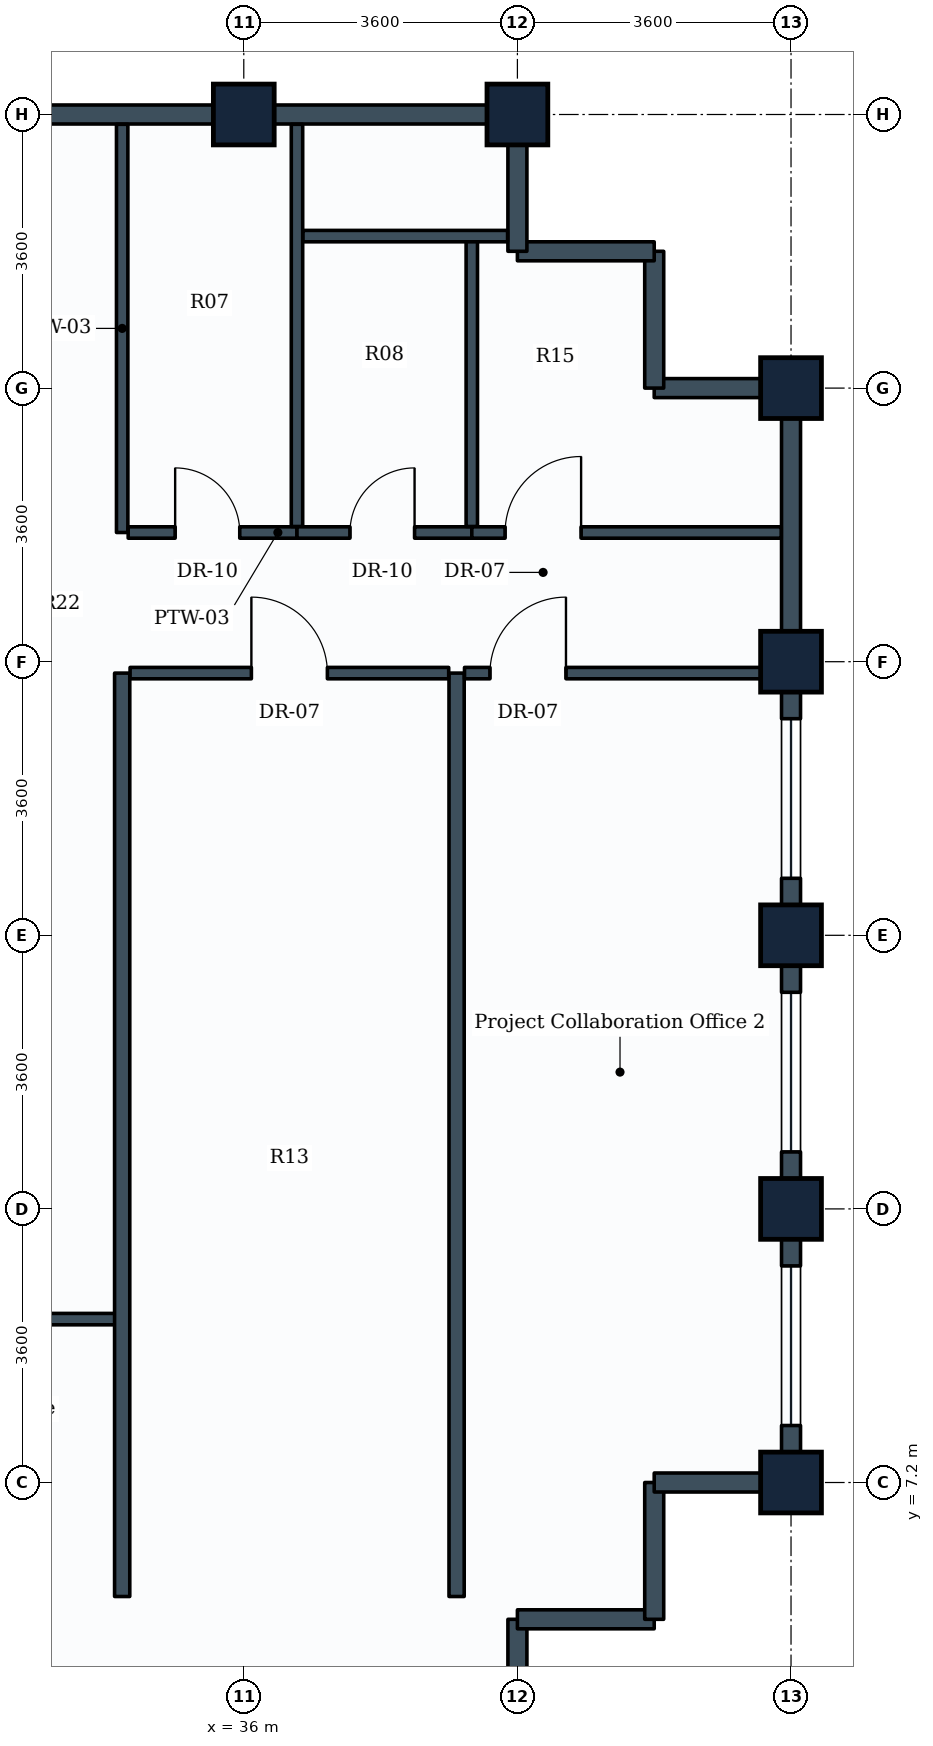
"""IFC4 building model, lengths in metres.
Left out: names, types, materials, properties, quantities, classifications, styles, units other than length and angle.
Written with IfcOpenShell. Run it as: python <this file> out.ifc"""

import sys

from ifc_helpers import new_model, si_unit, direction, frame, frame_2d, origin, origin_2d, place, context, subcontext, project, spatial, rectangle, extrude, element, fill, save


model = new_model("IFC4")
c1 = context("Model", 3, precision=1e-05, world=origin(), true_north=direction((0.0, 1.0)))
c2 = subcontext(c1, "Body", "Model", "MODEL_VIEW")
j1 = project(units=[si_unit("LENGTHUNIT", "METRE"), si_unit("PLANEANGLEUNIT", "RADIAN")], contexts=[c1])
p1 = place(None, origin())
s1 = spatial("IfcSite", under=j1, at=p1, CompositionType="ELEMENT")
p2 = place(p1, origin())
s2 = spatial("IfcBuilding", under=s1, at=p2, CompositionType="ELEMENT")
p3 = place(p2, frame((0.0, 0.0, 270.2)))
s3 = spatial("IfcBuildingStorey", under=s2, at=p3, CompositionType="ELEMENT", Elevation=270.2)
for number, where, z_axis, x_axis in (
    (1, (36.0, 25.2, 0.0), (0.0, 0.0, 1.0), (1.0, 0.0, 0.0)),
    (2, (39.6, 25.2, 0.0), (0.0, 0.0, 1.0), (1.0, 0.0, 0.0)),
    (3, (43.2, 7.2, 0.0), (0.0, 0.0, 1.0), (1.0, 0.0, 0.0)),
    (4, (43.2, 10.8, 0.0), (0.0, 0.0, 1.0), (0.0, 1.0, 0.0)),
    (5, (43.2, 14.4, 0.0), (0.0, 0.0, 1.0), (0.0, 1.0, 0.0)),
    (6, (43.2, 18.0, 0.0), (0.0, 0.0, 1.0), (0.0, 1.0, 0.0)),
    (7, (43.2, 21.6, 0.0), (0.0, 0.0, 1.0), (0.0, 1.0, 0.0)),
):
    element("IfcColumn", number, at=place(p3, frame(where, z_axis=z_axis, x_axis=x_axis)), inside=s3, PredefinedType="COLUMN", context=c2, shape_type="SweptSolid", body=[
        extrude(rectangle(XDim=0.8, YDim=0.8, at=origin_2d()), origin(), (0.0, 0.0, 1.0), 3.6),
    ])
p4 = place(p3, frame((39.6, 5.4, 0.0), z_axis=(0.0, 0.0, 1.0), x_axis=(0.0, -1.0, 0.0)))
e8 = element("IfcWall", 8, at=p4, inside=s3, PredefinedType="STANDARD", context=c2, shape_type="SweptSolid", body=[
    extrude(rectangle(XDim=1.8, YDim=0.25, at=frame_2d((0.9, 0.0))), origin(), (0.0, 0.0, 1.0), 2.83),
])
p5 = place(p3, frame((41.4, 5.4, 0.0), z_axis=(0.0, 0.0, 1.0), x_axis=(-1.0, 0.0, 0.0)))
e9 = element("IfcWall", 9, at=p5, inside=s3, PredefinedType="STANDARD", context=c2, shape_type="SweptSolid", body=[
    extrude(rectangle(XDim=1.8, YDim=0.25, at=frame_2d((0.9, 0.0))), origin(), (0.0, 0.0, 1.0), 3.335),
])
p6 = place(p3, frame((41.4, 7.2, 0.0), z_axis=(0.0, 0.0, 1.0), x_axis=(0.0, -1.0, 0.0)))
e10 = element("IfcWall", 10, at=p6, inside=s3, PredefinedType="STANDARD", context=c2, shape_type="SweptSolid", body=[
    extrude(rectangle(XDim=1.8, YDim=0.25, at=frame_2d((0.9, 0.0))), origin(), (0.0, 0.0, 1.0), 3.335),
])
p7 = place(p3, frame((43.2, 7.2, 0.0), z_axis=(0.0, 0.0, 1.0), x_axis=(-1.0, 0.0, 0.0)))
e11 = element("IfcWall", 11, at=p7, inside=s3, PredefinedType="STANDARD", context=c2, shape_type="SweptSolid", body=[
    extrude(rectangle(XDim=1.8, YDim=0.25, at=frame_2d((0.9, 0.0))), origin(), (0.0, 0.0, 1.0), 2.83),
])
p8 = place(p3, frame((43.2, 10.8, 0.0), z_axis=(0.0, 0.0, 1.0), x_axis=(0.0, -1.0, 0.0)))
e12 = element("IfcWall", 12, at=p8, inside=s3, PredefinedType="STANDARD", context=c2, shape_type="SweptSolid", body=[
    extrude(rectangle(XDim=3.6, YDim=0.25, at=frame_2d((1.8, 0.0))), origin(), (0.0, 0.0, 1.0), 2.83),
])
p9 = place(p8, frame((0.75, 0.0, 0.85)))
e13 = element("IfcOpeningElement", 13, at=p9, cuts=e12, PredefinedType="OPENING", context=c2, shape_type="SweptSolid", body=[
    extrude(rectangle(XDim=2.1, YDim=1.35, at=frame_2d((1.05, 0.675))), frame((0.0, 0.135, 0.0), z_axis=(0.0, -1.0, 0.0), x_axis=(1.0, 0.0, 0.0)), (0.0, 0.0, 1.0), 0.27),
])
p10 = place(p3, frame((43.2, 14.4, 0.0), z_axis=(0.0, 0.0, 1.0), x_axis=(0.0, -1.0, 0.0)))
e14 = element("IfcWall", 14, at=p10, inside=s3, PredefinedType="STANDARD", context=c2, shape_type="SweptSolid", body=[
    extrude(rectangle(XDim=3.6, YDim=0.25, at=frame_2d((1.8, 0.0))), origin(), (0.0, 0.0, 1.0), 2.83),
])
p11 = place(p10, frame((0.75, 0.0, 0.85)))
e15 = element("IfcOpeningElement", 15, at=p11, cuts=e14, PredefinedType="OPENING", context=c2, shape_type="SweptSolid", body=[
    extrude(rectangle(XDim=2.1, YDim=1.35, at=frame_2d((1.05, 0.675))), frame((0.0, 0.135, 0.0), z_axis=(0.0, -1.0, 0.0), x_axis=(1.0, 0.0, 0.0)), (0.0, 0.0, 1.0), 0.27),
])
p12 = place(p3, frame((43.2, 18.0, 0.0), z_axis=(0.0, 0.0, 1.0), x_axis=(0.0, -1.0, 0.0)))
e16 = element("IfcWall", 16, at=p12, inside=s3, PredefinedType="STANDARD", context=c2, shape_type="SweptSolid", body=[
    extrude(rectangle(XDim=3.6, YDim=0.25, at=frame_2d((1.8, 0.0))), origin(), (0.0, 0.0, 1.0), 2.83),
])
p13 = place(p12, frame((0.75, 0.0, 0.85)))
e17 = element("IfcOpeningElement", 17, at=p13, cuts=e16, PredefinedType="OPENING", context=c2, shape_type="SweptSolid", body=[
    extrude(rectangle(XDim=2.1, YDim=1.35, at=frame_2d((1.05, 0.675))), frame((0.0, 0.135, 0.0), z_axis=(0.0, -1.0, 0.0), x_axis=(1.0, 0.0, 0.0)), (0.0, 0.0, 1.0), 0.27),
])
p14 = place(p3, frame((43.2, 21.6, 0.0), z_axis=(0.0, 0.0, 1.0), x_axis=(0.0, -1.0, 0.0)))
e18 = element("IfcWall", 18, at=p14, inside=s3, PredefinedType="STANDARD", context=c2, shape_type="SweptSolid", body=[
    extrude(rectangle(XDim=3.6, YDim=0.25, at=frame_2d((1.8, 0.0))), origin(), (0.0, 0.0, 1.0), 2.83),
])
p15 = place(p3, frame((41.4, 21.6, 0.0), z_axis=(0.0, 0.0, 1.0), x_axis=(1.0, 0.0, 0.0)))
e19 = element("IfcWall", 19, at=p15, inside=s3, PredefinedType="STANDARD", context=c2, shape_type="SweptSolid", body=[
    extrude(rectangle(XDim=1.8, YDim=0.25, at=frame_2d((0.9, 0.0))), origin(), (0.0, 0.0, 1.0), 2.83),
])
for number, where, z_axis, x_axis in (
    (20, (41.4, 23.4, 0.0), (0.0, 0.0, 1.0), (0.0, -1.0, 0.0)),
    (21, (39.6, 23.4, 0.0), (0.0, 0.0, 1.0), (1.0, 0.0, 0.0)),
):
    element("IfcWall", number, at=place(p3, frame(where, z_axis=z_axis, x_axis=x_axis)), inside=s3, PredefinedType="STANDARD", context=c2, shape_type="SweptSolid", body=[
        extrude(rectangle(XDim=1.8, YDim=0.25, at=frame_2d((0.9, 0.0))), origin(), (0.0, 0.0, 1.0), 3.335),
    ])
p16 = place(p3, frame((39.6, 25.2, 0.0), z_axis=(0.0, 0.0, 1.0), x_axis=(0.0, -1.0, 0.0)))
e22 = element("IfcWall", 22, at=p16, inside=s3, PredefinedType="STANDARD", context=c2, shape_type="SweptSolid", body=[
    extrude(rectangle(XDim=1.8, YDim=0.25, at=frame_2d((0.9, 0.0))), origin(), (0.0, 0.0, 1.0), 2.83),
])
for number, where, z_axis, x_axis in (
    (23, (36.0, 25.2, 0.0), (0.0, 0.0, 1.0), (1.0, 0.0, 0.0)),
    (24, (32.4, 25.2, 0.0), (0.0, 0.0, 1.0), (1.0, 0.0, 0.0)),
):
    element("IfcWall", number, at=place(p3, frame(where, z_axis=z_axis, x_axis=x_axis)), inside=s3, PredefinedType="STANDARD", context=c2, shape_type="SweptSolid", body=[
        extrude(rectangle(XDim=3.6, YDim=0.25, at=frame_2d((1.8, 0.0))), origin(), (0.0, 0.0, 1.0), 2.83),
    ])
p17 = place(p3, frame((34.4, 19.7, 0.0), z_axis=(0.0, 0.0, 1.0), x_axis=(0.0, 1.0, 0.0)))
e25 = element("IfcWall", 25, at=p17, inside=s3, PredefinedType="PARTITIONING", context=c2, shape_type="SweptSolid", body=[
    extrude(rectangle(XDim=5.371, YDim=0.15, at=frame_2d((2.686, 0.0))), origin(), (0.0, 0.0, 1.0), 2.83),
])
p18 = place(p3, frame((34.479, 19.7, 0.0), z_axis=(0.0, 0.0, 1.0), x_axis=(1.0, 0.0, 0.0)))
e26 = element("IfcWall", 26, at=p18, inside=s3, PredefinedType="PARTITIONING", context=c2, shape_type="SweptSolid", body=[
    extrude(rectangle(XDim=2.221, YDim=0.15, at=frame_2d((1.11, 0.0))), origin(), (0.0, 0.0, 1.0), 3.02),
])
p19 = place(p18, frame((0.618, 0.0, 0.0)))
e27 = element("IfcOpeningElement", 27, at=p19, cuts=e26, PredefinedType="OPENING", context=c2, shape_type="SweptSolid", body=[
    extrude(rectangle(XDim=0.85, YDim=2.1, at=frame_2d((0.425, 1.05))), frame((0.0, 0.085, 0.0), z_axis=(0.0, -1.0, 0.0), x_axis=(1.0, 0.0, 0.0)), (0.0, 0.0, 1.0), 0.17),
])
p20 = place(p3, frame((36.7, 19.779, 0.0), z_axis=(0.0, 0.0, 1.0), x_axis=(0.0, 1.0, 0.0)))
e28 = element("IfcWall", 28, at=p20, inside=s3, PredefinedType="PARTITIONING", context=c2, shape_type="SweptSolid", body=[
    extrude(rectangle(XDim=5.292, YDim=0.15, at=frame_2d((2.646, 0.0))), origin(), (0.0, 0.0, 1.0), 2.83),
])
p21 = place(p3, frame((36.7, 19.7, 0.0), z_axis=(0.0, 0.0, 1.0), x_axis=(1.0, 0.0, 0.0)))
e29 = element("IfcWall", 29, at=p21, inside=s3, PredefinedType="PARTITIONING", context=c2, shape_type="SweptSolid", body=[
    extrude(rectangle(XDim=2.3, YDim=0.15, at=frame_2d((1.15, 0.0))), origin(), (0.0, 0.0, 1.0), 3.335),
])
p22 = place(p21, frame((0.697, 0.0, 0.0)))
e30 = element("IfcOpeningElement", 30, at=p22, cuts=e29, PredefinedType="OPENING", context=c2, shape_type="SweptSolid", body=[
    extrude(rectangle(XDim=0.85, YDim=2.1, at=frame_2d((0.425, 1.05))), frame((0.0, 0.085, 0.0), z_axis=(0.0, -1.0, 0.0), x_axis=(1.0, 0.0, 0.0)), (0.0, 0.0, 1.0), 0.17),
])
p23 = place(p3, frame((39.0, 19.779, 0.0), z_axis=(0.0, 0.0, 1.0), x_axis=(0.0, 1.0, 0.0)))
e31 = element("IfcWall", 31, at=p23, inside=s3, PredefinedType="PARTITIONING", context=c2, shape_type="SweptSolid", body=[
    extrude(rectangle(XDim=3.821, YDim=0.15, at=frame_2d((1.911, 0.0))), origin(), (0.0, 0.0, 1.0), 3.335),
])
p24 = place(p3, frame((36.779, 23.6, 0.0), z_axis=(0.0, 0.0, 1.0), x_axis=(1.0, 0.0, 0.0)))
e32 = element("IfcWall", 32, at=p24, inside=s3, PredefinedType="PARTITIONING", context=c2, shape_type="SweptSolid", body=[
    extrude(rectangle(XDim=2.692, YDim=0.15, at=frame_2d((1.346, 0.0))), origin(), (0.0, 0.0, 1.0), 3.335),
])
p25 = place(p3, frame((28.879, 9.35, 0.0), z_axis=(0.0, 0.0, 1.0), x_axis=(1.0, 0.0, 0.0)))
e33 = element("IfcWall", 33, at=p25, inside=s3, PredefinedType="PARTITIONING", context=c2, shape_type="SweptSolid", body=[
    extrude(rectangle(XDim=5.521, YDim=0.15, at=frame_2d((2.76, 0.0))), origin(), (0.0, 0.0, 1.0), 3.335),
])
p26 = place(p25, frame((0.36, 0.0, 0.0)))
e34 = element("IfcOpeningElement", 34, at=p26, cuts=e33, PredefinedType="OPENING", context=c2, shape_type="SweptSolid", body=[
    extrude(rectangle(XDim=1.0, YDim=2.1, at=frame_2d((0.5, 1.05))), frame((0.0, 0.085, 0.0), z_axis=(0.0, -1.0, 0.0), x_axis=(1.0, 0.0, 0.0)), (0.0, 0.0, 1.0), 0.17),
])
for number, where, z_axis, x_axis in (
    (35, (34.4, 5.7, 0.0), (0.0, 0.0, 1.0), (0.0, 1.0, 0.0)),
    (36, (38.8, 5.7, 0.0), (0.0, 0.0, 1.0), (0.0, 1.0, 0.0)),
):
    element("IfcWall", number, at=place(p3, frame(where, z_axis=z_axis, x_axis=x_axis)), inside=s3, PredefinedType="PARTITIONING", context=c2, shape_type="SweptSolid", body=[
        extrude(rectangle(XDim=12.15, YDim=0.2, at=frame_2d((6.075, 0.0))), origin(), (0.0, 0.0, 1.0), 3.03),
    ])
p27 = place(p3, frame((34.504, 17.85, 0.0), z_axis=(0.0, 0.0, 1.0), x_axis=(1.0, 0.0, 0.0)))
e37 = element("IfcWall", 37, at=p27, inside=s3, PredefinedType="PARTITIONING", context=c2, shape_type="SweptSolid", body=[
    extrude(rectangle(XDim=4.192, YDim=0.15, at=frame_2d((2.096, 0.0))), origin(), (0.0, 0.0, 1.0), 3.02),
])
p28 = place(p27, frame((1.596, 0.0, 0.0)))
e38 = element("IfcOpeningElement", 38, at=p28, cuts=e37, PredefinedType="OPENING", context=c2, shape_type="SweptSolid", body=[
    extrude(rectangle(XDim=1.0, YDim=2.1, at=frame_2d((0.5, 1.05))), frame((0.0, 0.085, 0.0), z_axis=(0.0, -1.0, 0.0), x_axis=(1.0, 0.0, 0.0)), (0.0, 0.0, 1.0), 0.17),
])
p29 = place(p3, frame((38.904, 17.85, 0.0), z_axis=(0.0, 0.0, 1.0), x_axis=(1.0, 0.0, 0.0)))
e39 = element("IfcWall", 39, at=p29, inside=s3, PredefinedType="PARTITIONING", context=c2, shape_type="SweptSolid", body=[
    extrude(rectangle(XDim=4.167, YDim=0.15, at=frame_2d((2.083, 0.0))), origin(), (0.0, 0.0, 1.0), 2.83),
])
p30 = place(p29, frame((0.335, 0.0, 0.0)))
e40 = element("IfcOpeningElement", 40, at=p30, cuts=e39, PredefinedType="OPENING", context=c2, shape_type="SweptSolid", body=[
    extrude(rectangle(XDim=1.0, YDim=2.1, at=frame_2d((0.5, 1.05))), frame((0.0, 0.085, 0.0), z_axis=(0.0, -1.0, 0.0), x_axis=(1.0, 0.0, 0.0)), (0.0, 0.0, 1.0), 0.17),
])
p31 = place(p3, frame((39.0, 19.7, 0.0), z_axis=(0.0, 0.0, 1.0), x_axis=(1.0, 0.0, 0.0)))
e41 = element("IfcWall", 41, at=p31, inside=s3, PredefinedType="PARTITIONING", context=c2, shape_type="SweptSolid", body=[
    extrude(rectangle(XDim=4.071, YDim=0.15, at=frame_2d((2.036, 0.0))), origin(), (0.0, 0.0, 1.0), 2.83),
])
p32 = place(p31, frame((0.438, 0.0, 0.0)))
e42 = element("IfcOpeningElement", 42, at=p32, cuts=e41, PredefinedType="OPENING", context=c2, shape_type="SweptSolid", body=[
    extrude(rectangle(XDim=1.0, YDim=2.1, at=frame_2d((0.5, 1.05))), frame((0.0, 0.085, 0.0), z_axis=(0.0, -1.0, 0.0), x_axis=(1.0, 0.0, 0.0)), (0.0, 0.0, 1.0), 0.17),
])
p33 = place(p9, origin())
e43 = element("IfcWindow", 43, at=p33, inside=s3, PartitioningType="SINGLE_PANEL", PredefinedType="WINDOW", context=c2, shape_type="SweptSolid", body=[
    extrude(rectangle(XDim=2.1, YDim=1.35, at=frame_2d((1.05, 0.675))), frame((0.0, 0.03, 0.0), z_axis=(0.0, -1.0, 0.0), x_axis=(1.0, 0.0, 0.0)), (0.0, 0.0, 1.0), 0.06),
])
fill(e13, e43)
p34 = place(p11, origin())
e44 = element("IfcWindow", 44, at=p34, inside=s3, PartitioningType="SINGLE_PANEL", PredefinedType="WINDOW", context=c2, shape_type="SweptSolid", body=[
    extrude(rectangle(XDim=2.1, YDim=1.35, at=frame_2d((1.05, 0.675))), frame((0.0, 0.03, 0.0), z_axis=(0.0, -1.0, 0.0), x_axis=(1.0, 0.0, 0.0)), (0.0, 0.0, 1.0), 0.06),
])
fill(e15, e44)
p35 = place(p13, origin())
e45 = element("IfcWindow", 45, at=p35, inside=s3, PartitioningType="SINGLE_PANEL", PredefinedType="WINDOW", context=c2, shape_type="SweptSolid", body=[
    extrude(rectangle(XDim=2.1, YDim=1.35, at=frame_2d((1.05, 0.675))), frame((0.0, 0.03, 0.0), z_axis=(0.0, -1.0, 0.0), x_axis=(1.0, 0.0, 0.0)), (0.0, 0.0, 1.0), 0.06),
])
fill(e17, e45)
p36 = place(p19, origin())
e46 = element("IfcDoor", 46, at=p36, inside=s3, OperationType="SINGLE_SWING_LEFT", PredefinedType="DOOR", context=c2, shape_type="SweptSolid", body=[
    extrude(rectangle(XDim=0.85, YDim=2.1, at=frame_2d((0.425, 1.05))), frame((0.0, 0.025, 0.0), z_axis=(0.0, -1.0, 0.0), x_axis=(1.0, 0.0, 0.0)), (0.0, 0.0, 1.0), 0.05),
])
fill(e27, e46)
p37 = place(p22, origin())
e47 = element("IfcDoor", 47, at=p37, inside=s3, OperationType="SINGLE_SWING_RIGHT", PredefinedType="DOOR", context=c2, shape_type="SweptSolid", body=[
    extrude(rectangle(XDim=0.85, YDim=2.1, at=frame_2d((0.425, 1.05))), frame((0.0, 0.025, 0.0), z_axis=(0.0, -1.0, 0.0), x_axis=(1.0, 0.0, 0.0)), (0.0, 0.0, 1.0), 0.05),
])
fill(e30, e47)
p38 = place(p28, origin())
e48 = element("IfcDoor", 48, at=p38, inside=s3, OperationType="SINGLE_SWING_LEFT", PredefinedType="DOOR", context=c2, shape_type="SweptSolid", body=[
    extrude(rectangle(XDim=1.0, YDim=2.1, at=frame_2d((0.5, 1.05))), frame((0.0, 0.025, 0.0), z_axis=(0.0, -1.0, 0.0), x_axis=(1.0, 0.0, 0.0)), (0.0, 0.0, 1.0), 0.05),
])
fill(e38, e48)
p39 = place(p30, origin())
e49 = element("IfcDoor", 49, at=p39, inside=s3, OperationType="SINGLE_SWING_RIGHT", PredefinedType="DOOR", context=c2, shape_type="SweptSolid", body=[
    extrude(rectangle(XDim=1.0, YDim=2.1, at=frame_2d((0.5, 1.05))), frame((0.0, 0.025, 0.0), z_axis=(0.0, -1.0, 0.0), x_axis=(1.0, 0.0, 0.0)), (0.0, 0.0, 1.0), 0.05),
])
fill(e40, e49)
p40 = place(p32, origin())
e50 = element("IfcDoor", 50, at=p40, inside=s3, OperationType="SINGLE_SWING_RIGHT", PredefinedType="DOOR", context=c2, shape_type="SweptSolid", body=[
    extrude(rectangle(XDim=1.0, YDim=2.1, at=frame_2d((0.5, 1.05))), frame((0.0, 0.025, 0.0), z_axis=(0.0, -1.0, 0.0), x_axis=(1.0, 0.0, 0.0)), (0.0, 0.0, 1.0), 0.05),
])
fill(e42, e50)
save(model, sys.argv[1])
